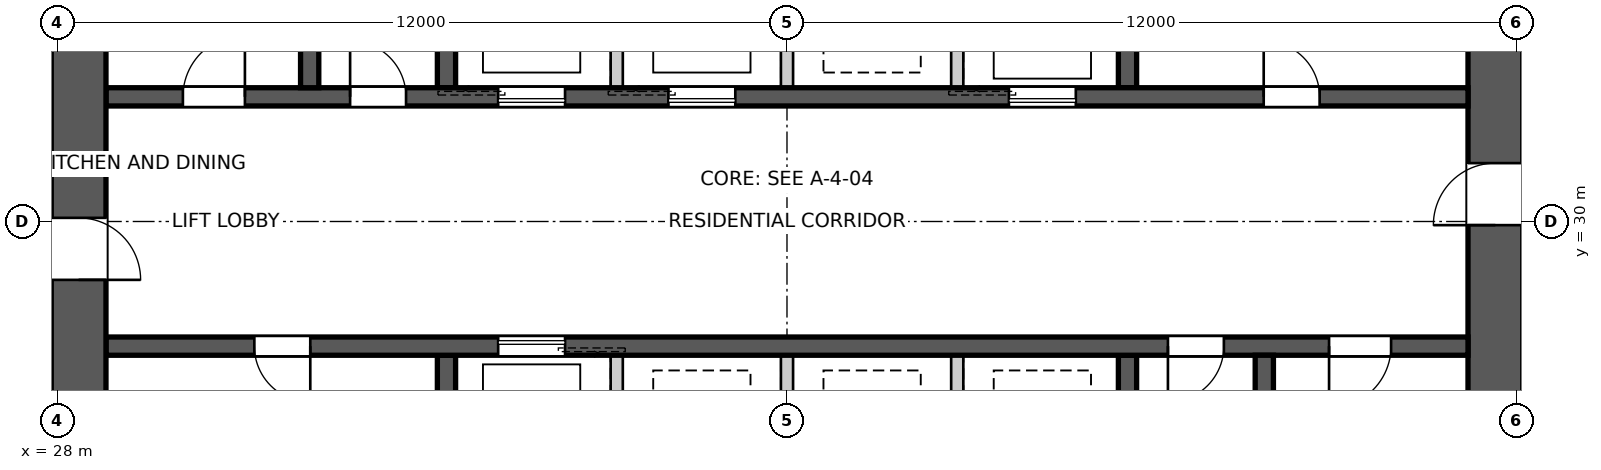
"""IFC4 building model, lengths in metres.
Left out: names, types, materials, properties, quantities, classifications, styles, units other than length and angle.
Written with IfcOpenShell. Run it as: python <this file> out.ifc"""

import sys

from ifc_helpers import new_model, si_unit, direction, frame, frame_2d, origin, place, context, subcontext, project, spatial, polyline, rectangle, outline, extrude, element, fill, save


model = new_model("IFC4")
c1 = context("Model", 3, precision=1e-05, world=origin(), true_north=direction((0.0, 1.0)))
c2 = subcontext(c1, "Body", "Model", "MODEL_VIEW")
j1 = project(units=[si_unit("LENGTHUNIT", "METRE"), si_unit("PLANEANGLEUNIT", "RADIAN")], contexts=[c1])
p1 = place(None, origin())
s1 = spatial("IfcSite", under=j1, at=p1, CompositionType="ELEMENT")
p2 = place(p1, origin())
s2 = spatial("IfcBuilding", under=s1, at=p2, CompositionType="ELEMENT")
p3 = place(p2, frame((0.0, 0.0, 28.6)))
s3 = spatial("IfcBuildingStorey", under=s2, at=p3, CompositionType="ELEMENT", Elevation=28.6)
p4 = place(p3, frame((51.65, 18.8, 0.0), z_axis=(0.0, 0.0, 1.0), x_axis=(0.0, 1.0, 0.0)))
e1 = element("IfcWall", 1, at=p4, inside=s3, PredefinedType="SHEAR", context=c2, shape_type="SweptSolid", body=[
    extrude(outline(polyline([(0.0, -0.45), (22.4, -0.45), (22.4, -0.025), (22.85, -0.025), (22.85, 0.025), (22.4, 0.025), (22.4, 0.45), (0.0, 0.45), (0.0, 0.025), (-0.45, 0.025), (-0.45, -0.025), (0.0, -0.025), (0.0, -0.45)])), origin(), (0.0, 0.0, 1.0), 3.4),
])
p5 = place(p4, frame((11.14, 0.0, 0.0)))
e2 = element("IfcOpeningElement", 2, at=p5, cuts=e1, PredefinedType="OPENING", context=c2, shape_type="SweptSolid", body=[
    extrude(rectangle(XDim=1.02, YDim=2.4, at=frame_2d((0.51, 1.2))), frame((0.0, 0.46, 0.0), z_axis=(0.0, -1.0, 0.0), x_axis=(1.0, 0.0, 0.0)), (0.0, 0.0, 1.0), 0.92),
])
p6 = place(p3, frame((28.35, 41.2, 0.0), z_axis=(0.0, 0.0, 1.0), x_axis=(0.0, -1.0, 0.0)))
e3 = element("IfcWall", 3, at=p6, inside=s3, PredefinedType="SHEAR", context=c2, shape_type="SweptSolid", body=[
    extrude(outline(polyline([(0.0, -0.45), (22.4, -0.45), (22.4, -0.025), (22.85, -0.025), (22.85, 0.025), (22.4, 0.025), (22.4, 0.45), (0.0, 0.45), (0.0, 0.025), (-0.45, 0.025), (-0.45, -0.025), (0.0, -0.025), (0.0, -0.45)])), origin(), (0.0, 0.0, 1.0), 3.4),
])
p7 = place(p6, frame((11.14, 0.0, 0.0)))
e4 = element("IfcOpeningElement", 4, at=p7, cuts=e3, PredefinedType="OPENING", context=c2, shape_type="SweptSolid", body=[
    extrude(rectangle(XDim=1.02, YDim=2.4, at=frame_2d((0.51, 1.2))), frame((0.0, 0.46, 0.0), z_axis=(0.0, -1.0, 0.0), x_axis=(1.0, 0.0, 0.0)), (0.0, 0.0, 1.0), 0.92),
])
p8 = place(p3, frame((28.8, 32.05, 0.0), z_axis=(0.0, 0.0, 1.0), x_axis=(1.0, 0.0, 0.0)))
e5 = element("IfcWall", 5, at=p8, inside=s3, PredefinedType="SHEAR", context=c2, shape_type="SweptSolid", body=[
    extrude(rectangle(XDim=22.4, YDim=0.3, at=frame_2d((11.2, 0.0))), origin(), (0.0, 0.0, 1.0), 3.4),
])
p9 = place(p8, frame((19.04, 0.0, 0.0)))
e6 = element("IfcOpeningElement", 6, at=p9, cuts=e5, PredefinedType="OPENING", context=c2, shape_type="SweptSolid", body=[
    extrude(rectangle(XDim=0.92, YDim=2.1, at=frame_2d((0.46, 1.05))), frame((0.0, 0.16, 0.0), z_axis=(0.0, -1.0, 0.0), x_axis=(1.0, 0.0, 0.0)), (0.0, 0.0, 1.0), 0.32),
])
p10 = place(p8, frame((1.265, 0.0, 0.0)))
e7 = element("IfcOpeningElement", 7, at=p10, cuts=e5, PredefinedType="OPENING", context=c2, shape_type="SweptSolid", body=[
    extrude(rectangle(XDim=1.02, YDim=2.1, at=frame_2d((0.51, 1.05))), frame((0.0, 0.16, 0.0), z_axis=(0.0, -1.0, 0.0), x_axis=(1.0, 0.0, 0.0)), (0.0, 0.0, 1.0), 0.32),
])
p11 = place(p8, frame((4.015, 0.0, 0.0)))
e8 = element("IfcOpeningElement", 8, at=p11, cuts=e5, PredefinedType="OPENING", context=c2, shape_type="SweptSolid", body=[
    extrude(rectangle(XDim=0.92, YDim=2.1, at=frame_2d((0.46, 1.05))), frame((0.0, 0.16, 0.0), z_axis=(0.0, -1.0, 0.0), x_axis=(1.0, 0.0, 0.0)), (0.0, 0.0, 1.0), 0.32),
])
p12 = place(p8, frame((6.45, 0.0, 0.0)))
e9 = element("IfcOpeningElement", 9, at=p12, cuts=e5, PredefinedType="OPENING", context=c2, shape_type="SweptSolid", body=[
    extrude(rectangle(XDim=1.1, YDim=2.1, at=frame_2d((0.55, 1.05))), frame((0.0, 0.16, 0.0), z_axis=(0.0, -1.0, 0.0), x_axis=(1.0, 0.0, 0.0)), (0.0, 0.0, 1.0), 0.32),
])
p13 = place(p8, frame((9.25, 0.0, 0.0)))
e10 = element("IfcOpeningElement", 10, at=p13, cuts=e5, PredefinedType="OPENING", context=c2, shape_type="SweptSolid", body=[
    extrude(rectangle(XDim=1.1, YDim=2.1, at=frame_2d((0.55, 1.05))), frame((0.0, 0.16, 0.0), z_axis=(0.0, -1.0, 0.0), x_axis=(1.0, 0.0, 0.0)), (0.0, 0.0, 1.0), 0.32),
])
p14 = place(p8, frame((14.85, 0.0, 0.0)))
e11 = element("IfcOpeningElement", 11, at=p14, cuts=e5, PredefinedType="OPENING", context=c2, shape_type="SweptSolid", body=[
    extrude(rectangle(XDim=1.1, YDim=2.1, at=frame_2d((0.55, 1.05))), frame((0.0, 0.16, 0.0), z_axis=(0.0, -1.0, 0.0), x_axis=(1.0, 0.0, 0.0)), (0.0, 0.0, 1.0), 0.32),
])
p15 = place(p3, frame((51.2, 27.95, 0.0), z_axis=(0.0, 0.0, 1.0), x_axis=(-1.0, 0.0, 0.0)))
e12 = element("IfcWall", 12, at=p15, inside=s3, PredefinedType="SHEAR", context=c2, shape_type="SweptSolid", body=[
    extrude(rectangle(XDim=22.4, YDim=0.3, at=frame_2d((11.2, 0.0))), origin(), (0.0, 0.0, 1.0), 3.4),
])
p16 = place(p15, frame((19.04, 0.0, 0.0)))
e13 = element("IfcOpeningElement", 13, at=p16, cuts=e12, PredefinedType="OPENING", context=c2, shape_type="SweptSolid", body=[
    extrude(rectangle(XDim=0.92, YDim=2.1, at=frame_2d((0.46, 1.05))), frame((0.0, 0.16, 0.0), z_axis=(0.0, -1.0, 0.0), x_axis=(1.0, 0.0, 0.0)), (0.0, 0.0, 1.0), 0.32),
])
p17 = place(p15, frame((1.265, 0.0, 0.0)))
e14 = element("IfcOpeningElement", 14, at=p17, cuts=e12, PredefinedType="OPENING", context=c2, shape_type="SweptSolid", body=[
    extrude(rectangle(XDim=1.02, YDim=2.1, at=frame_2d((0.51, 1.05))), frame((0.0, 0.16, 0.0), z_axis=(0.0, -1.0, 0.0), x_axis=(1.0, 0.0, 0.0)), (0.0, 0.0, 1.0), 0.32),
])
p18 = place(p15, frame((4.015, 0.0, 0.0)))
e15 = element("IfcOpeningElement", 15, at=p18, cuts=e12, PredefinedType="OPENING", context=c2, shape_type="SweptSolid", body=[
    extrude(rectangle(XDim=0.92, YDim=2.1, at=frame_2d((0.46, 1.05))), frame((0.0, 0.16, 0.0), z_axis=(0.0, -1.0, 0.0), x_axis=(1.0, 0.0, 0.0)), (0.0, 0.0, 1.0), 0.32),
])
p19 = place(p15, frame((14.85, 0.0, 0.0)))
e16 = element("IfcOpeningElement", 16, at=p19, cuts=e12, PredefinedType="OPENING", context=c2, shape_type="SweptSolid", body=[
    extrude(rectangle(XDim=1.1, YDim=2.1, at=frame_2d((0.55, 1.05))), frame((0.0, 0.16, 0.0), z_axis=(0.0, -1.0, 0.0), x_axis=(1.0, 0.0, 0.0)), (0.0, 0.0, 1.0), 0.32),
])
for number, where, z_axis, x_axis in (
    (17, (34.4, 32.2, 0.0), (0.0, 0.0, 1.0), (0.0, 1.0, 0.0)),
    (18, (45.6, 27.8, 0.0), (0.0, 0.0, 1.0), (0.0, -1.0, 0.0)),
):
    element("IfcWall", number, at=place(p3, frame(where, z_axis=z_axis, x_axis=x_axis)), inside=s3, PredefinedType="SHEAR", context=c2, shape_type="SweptSolid", body=[
        extrude(rectangle(XDim=2.8, YDim=0.3, at=frame_2d((1.4, 0.0))), origin(), (0.0, 0.0, 1.0), 3.4),
    ])
for number, where, z_axis, x_axis in (
    (19, (37.2, 32.2, 0.0), (0.0, 0.0, 1.0), (0.0, 1.0, 0.0)),
    (20, (42.8, 27.8, 0.0), (0.0, 0.0, 1.0), (0.0, -1.0, 0.0)),
    (21, (40.0, 32.2, 0.0), (0.0, 0.0, 1.0), (0.0, 1.0, 0.0)),
    (22, (40.0, 27.8, 0.0), (0.0, 0.0, 1.0), (0.0, -1.0, 0.0)),
    (23, (42.8, 32.2, 0.0), (0.0, 0.0, 1.0), (0.0, 1.0, 0.0)),
    (24, (37.2, 27.8, 0.0), (0.0, 0.0, 1.0), (0.0, -1.0, 0.0)),
):
    element("IfcWall", number, at=place(p3, frame(where, z_axis=z_axis, x_axis=x_axis)), inside=s3, PredefinedType="SOLIDWALL", context=c2, shape_type="SweptSolid", body=[
        extrude(rectangle(XDim=2.8, YDim=0.2, at=frame_2d((1.4, 0.0))), origin(), (0.0, 0.0, 1.0), 3.4),
    ])
for number, where, z_axis, x_axis in (
    (25, (45.6, 32.2, 0.0), (0.0, 0.0, 1.0), (0.0, 1.0, 0.0)),
    (26, (34.4, 27.8, 0.0), (0.0, 0.0, 1.0), (0.0, -1.0, 0.0)),
):
    element("IfcWall", number, at=place(p3, frame(where, z_axis=z_axis, x_axis=x_axis)), inside=s3, PredefinedType="SHEAR", context=c2, shape_type="SweptSolid", body=[
        extrude(rectangle(XDim=2.8, YDim=0.3, at=frame_2d((1.4, 0.0))), origin(), (0.0, 0.0, 1.0), 3.4),
    ])
for number, where, z_axis, x_axis in (
    (27, (32.15, 32.2, 0.0), (0.0, 0.0, 1.0), (0.0, 1.0, 0.0)),
    (28, (47.85, 27.8, 0.0), (0.0, 0.0, 1.0), (0.0, -1.0, 0.0)),
):
    element("IfcWall", number, at=place(p3, frame(where, z_axis=z_axis, x_axis=x_axis)), inside=s3, PredefinedType="SHEAR", context=c2, shape_type="SweptSolid", body=[
        extrude(rectangle(XDim=7.7, YDim=0.3, at=frame_2d((3.85, 0.0))), origin(), (0.0, 0.0, 1.0), 3.4),
    ])
p20 = place(p9, origin())
e29 = element("IfcDoor", 29, at=p20, inside=s3, OperationType="SINGLE_SWING_LEFT", PredefinedType="DOOR", context=c2, shape_type="SweptSolid", body=[
    extrude(rectangle(XDim=0.92, YDim=2.1, at=frame_2d((0.46, 1.05))), frame((0.0, 0.025, 0.0), z_axis=(0.0, -1.0, 0.0), x_axis=(1.0, 0.0, 0.0)), (0.0, 0.0, 1.0), 0.05),
])
fill(e6, e29)
p21 = place(p16, origin())
e30 = element("IfcDoor", 30, at=p21, inside=s3, OperationType="SINGLE_SWING_LEFT", PredefinedType="DOOR", context=c2, shape_type="SweptSolid", body=[
    extrude(rectangle(XDim=0.92, YDim=2.1, at=frame_2d((0.46, 1.05))), frame((0.0, 0.025, 0.0), z_axis=(0.0, -1.0, 0.0), x_axis=(1.0, 0.0, 0.0)), (0.0, 0.0, 1.0), 0.05),
])
fill(e13, e30)
p22 = place(p17, origin())
e31 = element("IfcDoor", 31, at=p22, inside=s3, OperationType="SINGLE_SWING_RIGHT", PredefinedType="DOOR", context=c2, shape_type="SweptSolid", body=[
    extrude(rectangle(XDim=1.02, YDim=2.1, at=frame_2d((0.51, 1.05))), frame((0.0, 0.025, 0.0), z_axis=(0.0, -1.0, 0.0), x_axis=(1.0, 0.0, 0.0)), (0.0, 0.0, 1.0), 0.05),
])
fill(e14, e31)
p23 = place(p10, origin())
e32 = element("IfcDoor", 32, at=p23, inside=s3, OperationType="SINGLE_SWING_RIGHT", PredefinedType="DOOR", context=c2, shape_type="SweptSolid", body=[
    extrude(rectangle(XDim=1.02, YDim=2.1, at=frame_2d((0.51, 1.05))), frame((0.0, 0.025, 0.0), z_axis=(0.0, -1.0, 0.0), x_axis=(1.0, 0.0, 0.0)), (0.0, 0.0, 1.0), 0.05),
])
fill(e7, e32)
p24 = place(p11, origin())
e33 = element("IfcDoor", 33, at=p24, inside=s3, OperationType="SINGLE_SWING_LEFT", PredefinedType="DOOR", context=c2, shape_type="SweptSolid", body=[
    extrude(rectangle(XDim=0.92, YDim=2.1, at=frame_2d((0.46, 1.05))), frame((0.0, 0.025, 0.0), z_axis=(0.0, -1.0, 0.0), x_axis=(1.0, 0.0, 0.0)), (0.0, 0.0, 1.0), 0.05),
])
fill(e8, e33)
p25 = place(p18, origin())
e34 = element("IfcDoor", 34, at=p25, inside=s3, OperationType="SINGLE_SWING_RIGHT", PredefinedType="DOOR", context=c2, shape_type="SweptSolid", body=[
    extrude(rectangle(XDim=0.92, YDim=2.1, at=frame_2d((0.46, 1.05))), frame((0.0, 0.025, 0.0), z_axis=(0.0, -1.0, 0.0), x_axis=(1.0, 0.0, 0.0)), (0.0, 0.0, 1.0), 0.05),
])
fill(e15, e34)
p26 = place(p5, origin())
e35 = element("IfcDoor", 35, at=p26, inside=s3, OperationType="SINGLE_SWING_LEFT", PredefinedType="DOOR", context=c2, shape_type="SweptSolid", body=[
    extrude(rectangle(XDim=1.02, YDim=2.4, at=frame_2d((0.51, 1.2))), frame((0.0, 0.025, 0.0), z_axis=(0.0, -1.0, 0.0), x_axis=(1.0, 0.0, 0.0)), (0.0, 0.0, 1.0), 0.05),
])
fill(e2, e35)
p27 = place(p7, origin())
e36 = element("IfcDoor", 36, at=p27, inside=s3, OperationType="SINGLE_SWING_RIGHT", PredefinedType="DOOR", context=c2, shape_type="SweptSolid", body=[
    extrude(rectangle(XDim=1.02, YDim=2.4, at=frame_2d((0.51, 1.2))), frame((0.0, 0.025, 0.0), z_axis=(0.0, -1.0, 0.0), x_axis=(1.0, 0.0, 0.0)), (0.0, 0.0, 1.0), 0.05),
])
fill(e4, e36)
p28 = place(p12, origin())
e37 = element("IfcDoor", 37, at=p28, inside=s3, OperationType="SLIDING_TO_LEFT", PredefinedType="DOOR", context=c2, shape_type="SweptSolid", body=[
    extrude(rectangle(XDim=1.1, YDim=2.1, at=frame_2d((0.55, 1.05))), frame((0.0, 0.025, 0.0), z_axis=(0.0, -1.0, 0.0), x_axis=(1.0, 0.0, 0.0)), (0.0, 0.0, 1.0), 0.05),
])
fill(e9, e37)
p29 = place(p13, origin())
e38 = element("IfcDoor", 38, at=p29, inside=s3, OperationType="SLIDING_TO_LEFT", PredefinedType="DOOR", context=c2, shape_type="SweptSolid", body=[
    extrude(rectangle(XDim=1.1, YDim=2.1, at=frame_2d((0.55, 1.05))), frame((0.0, 0.025, 0.0), z_axis=(0.0, -1.0, 0.0), x_axis=(1.0, 0.0, 0.0)), (0.0, 0.0, 1.0), 0.05),
])
fill(e10, e38)
p30 = place(p14, origin())
e39 = element("IfcDoor", 39, at=p30, inside=s3, OperationType="SLIDING_TO_LEFT", PredefinedType="DOOR", context=c2, shape_type="SweptSolid", body=[
    extrude(rectangle(XDim=1.1, YDim=2.1, at=frame_2d((0.55, 1.05))), frame((0.0, 0.025, 0.0), z_axis=(0.0, -1.0, 0.0), x_axis=(1.0, 0.0, 0.0)), (0.0, 0.0, 1.0), 0.05),
])
fill(e11, e39)
p31 = place(p19, origin())
e40 = element("IfcDoor", 40, at=p31, inside=s3, OperationType="SLIDING_TO_LEFT", PredefinedType="DOOR", context=c2, shape_type="SweptSolid", body=[
    extrude(rectangle(XDim=1.1, YDim=2.1, at=frame_2d((0.55, 1.05))), frame((0.0, 0.025, 0.0), z_axis=(0.0, -1.0, 0.0), x_axis=(1.0, 0.0, 0.0)), (0.0, 0.0, 1.0), 0.05),
])
fill(e16, e40)
save(model, sys.argv[1])
